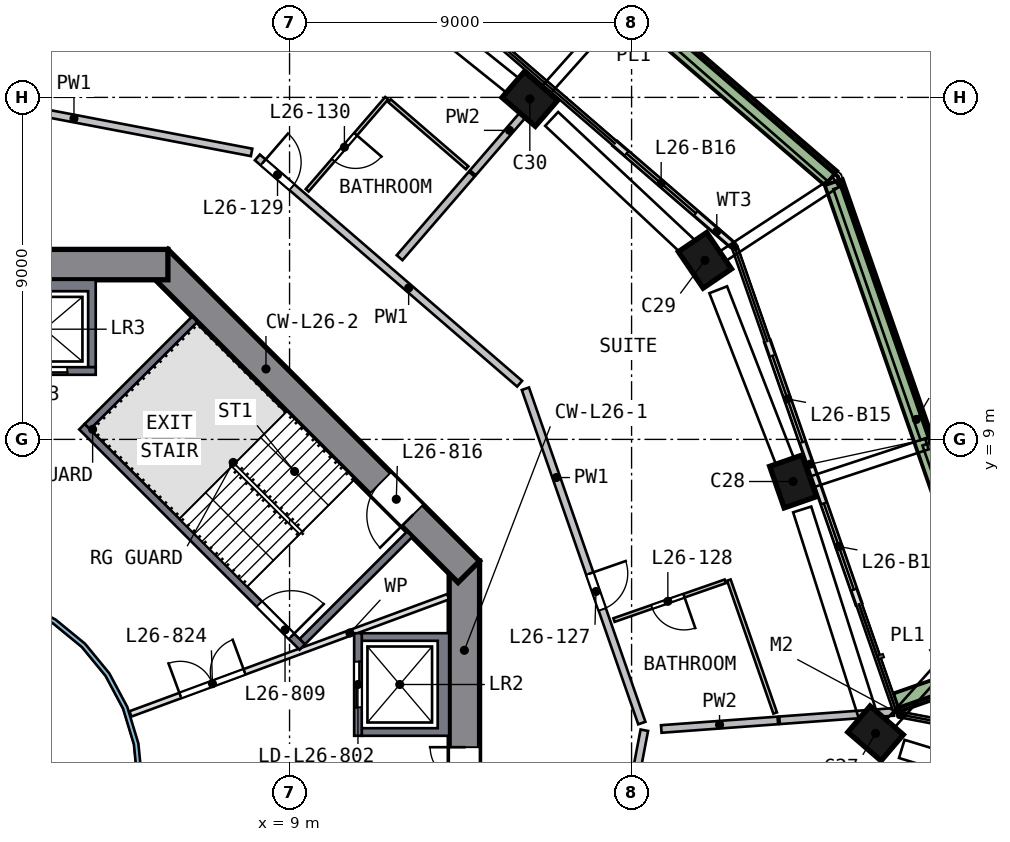
"""IFC4 building model, lengths in metres.
Left out: names, types, materials, properties, quantities, classifications, styles, units other than length and angle.
Written with IfcOpenShell. Run it as: python <this file> out.ifc"""

import sys

from ifc_helpers import new_model, si_unit, direction, frame, frame_2d, origin, origin_2d, place, context, subcontext, project, spatial, polyline, rectangle, outline, extrude, element, fill, save


model = new_model("IFC4")
c1 = context("Model", 3, precision=1e-05, world=origin(), true_north=direction((0.0, 1.0)))
c2 = subcontext(c1, "Body", "Model", "MODEL_VIEW")
j1 = project(units=[si_unit("LENGTHUNIT", "METRE"), si_unit("PLANEANGLEUNIT", "RADIAN")], contexts=[c1])
p1 = place(None, origin())
s1 = spatial("IfcSite", under=j1, at=p1, CompositionType="ELEMENT")
p2 = place(p1, origin())
s2 = spatial("IfcBuilding", under=s1, at=p2, CompositionType="ELEMENT")
p3 = place(p2, frame((0.0, 0.0, 111.5)))
s3 = spatial("IfcBuildingStorey", under=s2, at=p3, CompositionType="ELEMENT", Elevation=111.5)
p4 = place(p3, frame((24.428, 1.123, 0.0), z_axis=(-0.006309298, 0.116075877, 0.99322031), x_axis=(0.758959618, -0.646162715, 0.080337067)))
e1 = element("IfcColumn", 1, at=p4, inside=s3, PredefinedType="COLUMN", context=c2, shape_type="SweptSolid", body=[
    extrude(rectangle(XDim=1.15, YDim=0.9, at=origin_2d()), origin(), (0.0, 0.0, 1.0), 3.212),
])
p5 = place(p3, frame((22.295, 7.764, 0.0), z_axis=(-0.037872832, 0.105785359, 0.993667503), x_axis=(-0.326980648, 0.938328119, -0.112356557)))
e2 = element("IfcColumn", 2, at=p5, inside=s3, PredefinedType="COLUMN", context=c2, shape_type="SweptSolid", body=[
    extrude(rectangle(XDim=1.15, YDim=0.9, at=origin_2d()), origin(), (0.0, 0.0, 1.0), 3.21),
])
p6 = place(p3, frame((20.009, 13.598, 0.0), z_axis=(-0.065458875, 0.09457705, 0.993363135), x_axis=(0.558375251, -0.821576739, 0.115016268)))
e3 = element("IfcColumn", 3, at=p6, inside=s3, PredefinedType="COLUMN", context=c2, shape_type="SweptSolid", body=[
    extrude(rectangle(XDim=1.15, YDim=0.9, at=origin_2d()), origin(), (0.0, 0.0, 1.0), 3.211),
])
p7 = place(p3, frame((15.426, 17.871, 0.0), z_axis=(-0.085632411, 0.072703894, 0.993670586), x_axis=(-0.751997746, 0.649524072, -0.112329288)))
e4 = element("IfcColumn", 4, at=p7, inside=s3, PredefinedType="COLUMN", context=c2, shape_type="SweptSolid", body=[
    extrude(rectangle(XDim=1.15, YDim=0.9, at=origin_2d()), origin(), (0.0, 0.0, 1.0), 3.21),
])
p8 = place(p3, frame((13.6, -5.799, 0.0), z_axis=(0.0, 0.0, 1.0), x_axis=(0.0, 1.0, 0.0)))
e5 = element("IfcWall", 5, at=p8, inside=s3, PredefinedType="SHEAR", context=c2, shape_type="SweptSolid", body=[
    extrude(rectangle(XDim=11.598, YDim=0.8, at=frame_2d((5.799, 0.0))), origin(), (0.0, 0.0, 1.0), 3.5),
])
p9 = place(p8, frame((4.899, 0.0, 0.0)))
e6 = element("IfcOpeningElement", 6, at=p9, cuts=e5, PredefinedType="OPENING", context=c2, shape_type="SweptSolid", body=[
    extrude(rectangle(XDim=1.8, YDim=2.1, at=frame_2d((0.9, 1.05))), frame((0.0, 0.41, 0.0), z_axis=(0.0, -1.0, 0.0), x_axis=(1.0, 0.0, 0.0)), (0.0, 0.0, 1.0), 0.82),
])
p10 = place(p3, frame((13.717, 5.516, 0.0), z_axis=(0.0, 0.0, 1.0), x_axis=(-0.707106781, 0.707106781, 0.0)))
e7 = element("IfcWall", 7, at=p10, inside=s3, PredefinedType="SHEAR", context=c2, shape_type="SweptSolid", body=[
    extrude(rectangle(XDim=11.598, YDim=0.8, at=frame_2d((5.799, 0.0))), origin(), (0.0, 0.0, 1.0), 3.5),
])
p11 = place(p10, frame((2.099, 0.0, 0.0)))
e8 = element("IfcOpeningElement", 8, at=p11, cuts=e7, PredefinedType="OPENING", context=c2, shape_type="SweptSolid", body=[
    extrude(rectangle(XDim=1.2, YDim=2.1, at=frame_2d((0.6, 1.05))), frame((0.0, 0.41, 0.0), z_axis=(0.0, -1.0, 0.0), x_axis=(1.0, 0.0, 0.0)), (0.0, 0.0, 1.0), 0.82),
])
p12 = place(p3, frame((5.799, 13.6, 0.0), z_axis=(0.0, 0.0, 1.0), x_axis=(-1.0, 0.0, 0.0)))
e9 = element("IfcWall", 9, at=p12, inside=s3, PredefinedType="SHEAR", context=c2, shape_type="SweptSolid", body=[
    extrude(rectangle(XDim=11.598, YDim=0.8, at=frame_2d((5.799, 0.0))), origin(), (0.0, 0.0, 1.0), 3.5),
])
p13 = place(p12, frame((4.899, 0.0, 0.0)))
e10 = element("IfcOpeningElement", 10, at=p13, cuts=e9, PredefinedType="OPENING", context=c2, shape_type="SweptSolid", body=[
    extrude(rectangle(XDim=1.8, YDim=2.1, at=frame_2d((0.9, 1.05))), frame((0.0, 0.41, 0.0), z_axis=(0.0, -1.0, 0.0), x_axis=(1.0, 0.0, 0.0)), (0.0, 0.0, 1.0), 0.82),
])
p14 = place(p3, frame((23.981, 4.671, 0.0), z_axis=(0.0, 0.0, 1.0), x_axis=(-0.328866668, 0.944376363, 0.0)))
e11 = element("IfcWall", 11, at=p14, inside=s3, PredefinedType="SOLIDWALL", context=c2, shape_type="SweptSolid", body=[
    extrude(rectangle(XDim=3.475, YDim=0.15, at=frame_2d((1.738, 0.0))), origin(), (0.0, 0.0, 1.0), 2.425),
])
p15 = place(p14, frame((0.4, 0.0, 0.0)))
e12 = element("IfcOpeningElement", 12, at=p15, cuts=e11, PredefinedType="OPENING", context=c2, shape_type="SweptSolid", body=[
    extrude(rectangle(XDim=2.4, YDim=2.4, at=frame_2d((1.2, 1.2))), frame((0.0, 0.085, 0.0), z_axis=(0.0, -1.0, 0.0), x_axis=(1.0, 0.0, 0.0)), (0.0, 0.0, 1.0), 0.17),
])
p16 = place(p3, frame((22.838, 7.953, 0.0), z_axis=(0.0, 0.0, 1.0), x_axis=(-0.328841564, 0.944385104, 0.0)))
e13 = element("IfcWall", 13, at=p16, inside=s3, PredefinedType="SOLIDWALL", context=c2, shape_type="SweptSolid", body=[
    extrude(rectangle(XDim=3.835, YDim=0.15, at=frame_2d((1.918, 0.0))), origin(), (0.0, 0.0, 1.0), 2.425),
])
p17 = place(p16, frame((1.035, 0.0, 0.0)))
e14 = element("IfcOpeningElement", 14, at=p17, cuts=e13, PredefinedType="OPENING", context=c2, shape_type="SweptSolid", body=[
    extrude(rectangle(XDim=2.4, YDim=2.4, at=frame_2d((1.2, 1.2))), frame((0.0, 0.085, 0.0), z_axis=(0.0, -1.0, 0.0), x_axis=(1.0, 0.0, 0.0)), (0.0, 0.0, 1.0), 0.17),
])
p18 = place(p3, frame((20.646, 14.125, 0.0), z_axis=(0.0, 0.0, 1.0), x_axis=(-0.757002464, 0.653412021, 0.0)))
e15 = element("IfcWall", 15, at=p18, inside=s3, PredefinedType="SOLIDWALL", context=c2, shape_type="SweptSolid", body=[
    extrude(rectangle(XDim=4.068, YDim=0.15, at=frame_2d((2.034, 0.0))), origin(), (0.0, 0.0, 1.0), 2.425),
])
p19 = place(p18, frame((1.268, 0.0, 0.0)))
e16 = element("IfcOpeningElement", 16, at=p19, cuts=e15, PredefinedType="OPENING", context=c2, shape_type="SweptSolid", body=[
    extrude(rectangle(XDim=2.4, YDim=2.4, at=frame_2d((1.2, 1.2))), frame((0.0, 0.085, 0.0), z_axis=(0.0, -1.0, 0.0), x_axis=(1.0, 0.0, 0.0)), (0.0, 0.0, 1.0), 0.17),
])
p20 = place(p3, frame((24.965, 2.076, 0.0), z_axis=(0.0, 0.0, 1.0), x_axis=(0.944378331, 0.328861017, 0.0)))
e17 = element("IfcWall", 17, at=p20, inside=s3, PredefinedType="SOLIDWALL", context=c2, shape_type="SweptSolid", body=[
    extrude(rectangle(XDim=3.199, YDim=0.5, at=frame_2d((1.6, 0.0))), origin(), (0.0, 0.0, 1.0), 0.7),
])
p21 = place(p3, frame((27.668, 3.282, 0.0), z_axis=(0.0, 0.0, 1.0), x_axis=(-0.328877933, 0.94437244, 0.0)))
e18 = element("IfcWall", 18, at=p21, inside=s3, PredefinedType="SOLIDWALL", context=c2, shape_type="SweptSolid", body=[
    extrude(rectangle(XDim=13.223, YDim=0.5, at=frame_2d((6.612, 0.0))), origin(), (0.0, 0.0, 1.0), 0.7),
])
p22 = place(p3, frame((23.247, 15.877, 0.0), z_axis=(0.0, 0.0, 1.0), x_axis=(-0.757002985, 0.653411418, 0.0)))
e19 = element("IfcWall", 19, at=p22, inside=s3, PredefinedType="SOLIDWALL", context=c2, shape_type="SweptSolid", body=[
    extrude(rectangle(XDim=13.723, YDim=0.5, at=frame_2d((6.862, 0.0))), origin(), (0.0, 0.0, 1.0), 0.7),
])
p23 = place(p3, origin())
e20 = element("IfcWall", 20, at=p23, inside=s3, PredefinedType="SOLIDWALL", context=c2, shape_type="SweptSolid", body=[
    extrude(outline(polyline([(13.2, 3.9), (13.2, 1.2), (10.9, 1.2), (10.9, 1.4), (12.9, 1.4), (12.9, 3.7), (10.9, 3.7), (10.9, 3.9), (13.2, 3.9)])), origin(), (0.0, 0.0, 1.0), 3.19),
])
p24 = place(p3, frame((10.8, 1.2, 0.0), z_axis=(0.0, 0.0, 1.0), x_axis=(0.0, 1.0, 0.0)))
e21 = element("IfcWall", 21, at=p24, inside=s3, PredefinedType="SOLIDWALL", context=c2, shape_type="SweptSolid", body=[
    extrude(rectangle(XDim=2.7, YDim=0.2, at=frame_2d((1.35, 0.0))), origin(), (0.0, 0.0, 1.0), 3.19),
])
p25 = place(p24, frame((0.75, 0.0, 0.0)))
e22 = element("IfcOpeningElement", 22, at=p25, cuts=e21, PredefinedType="OPENING", context=c2, shape_type="SweptSolid", body=[
    extrude(rectangle(XDim=1.2, YDim=2.1, at=frame_2d((0.6, 1.05))), frame((0.0, 0.11, 0.0), z_axis=(0.0, -1.0, 0.0), x_axis=(1.0, 0.0, 0.0)), (0.0, 0.0, 1.0), 0.22),
])
p26 = place(p3, origin())
e23 = element("IfcWall", 23, at=p26, inside=s3, PredefinedType="SOLIDWALL", context=c2, shape_type="SweptSolid", body=[
    extrude(outline(polyline([(3.9, 13.2), (3.9, 10.9), (3.7, 10.9), (3.7, 12.9), (1.4, 12.9), (1.4, 10.9), (1.2, 10.9), (1.2, 13.2), (3.9, 13.2)])), origin(), (0.0, 0.0, 1.0), 3.19),
])
p27 = place(p3, frame((1.2, 10.8, 0.0), z_axis=(0.0, 0.0, 1.0), x_axis=(1.0, 0.0, 0.0)))
e24 = element("IfcWall", 24, at=p27, inside=s3, PredefinedType="SOLIDWALL", context=c2, shape_type="SweptSolid", body=[
    extrude(rectangle(XDim=2.7, YDim=0.2, at=frame_2d((1.35, 0.0))), origin(), (0.0, 0.0, 1.0), 3.19),
])
p28 = place(p27, frame((0.75, 0.0, 0.0)))
e25 = element("IfcOpeningElement", 25, at=p28, cuts=e24, PredefinedType="OPENING", context=c2, shape_type="SweptSolid", body=[
    extrude(rectangle(XDim=1.2, YDim=2.1, at=frame_2d((0.6, 1.05))), frame((0.0, 0.11, 0.0), z_axis=(0.0, -1.0, 0.0), x_axis=(1.0, 0.0, 0.0)), (0.0, 0.0, 1.0), 0.22),
])
p29 = place(p3, frame((3.535, 9.334, 0.0), z_axis=(0.0, 0.0, 1.0), x_axis=(0.707106781, -0.707106781, 0.0)))
e26 = element("IfcWall", 26, at=p29, inside=s3, PredefinedType="SOLIDWALL", context=c2, shape_type="SweptSolid", body=[
    extrude(rectangle(XDim=8.2, YDim=0.2, at=frame_2d((4.1, 0.0))), origin(), (0.0, 0.0, 1.0), 3.19),
])
p30 = place(p29, frame((6.6, 0.0, 0.0)))
e27 = element("IfcOpeningElement", 27, at=p30, cuts=e26, PredefinedType="OPENING", context=c2, shape_type="SweptSolid", body=[
    extrude(rectangle(XDim=1.2, YDim=2.1, at=frame_2d((0.6, 1.05))), frame((0.0, 0.11, 0.0), z_axis=(0.0, -1.0, 0.0), x_axis=(1.0, 0.0, 0.0)), (0.0, 0.0, 1.0), 0.22),
])
for number, where, z_axis, x_axis in (
    (28, (9.334, 3.677, 0.0), (0.0, 0.0, 1.0), (0.707, 0.707, 0.0)),
    (29, (3.677, 9.334, 0.0), (0.0, 0.0, 1.0), (0.707, 0.707, 0.0)),
):
    element("IfcWall", number, at=place(p3, frame(where, z_axis=z_axis, x_axis=x_axis)), inside=s3, PredefinedType="SOLIDWALL", context=c2, shape_type="SweptSolid", body=[
        extrude(rectangle(XDim=4.0, YDim=0.2, at=frame_2d((2.0, 0.0))), origin(), (0.0, 0.0, 1.0), 3.19),
    ])
p31 = place(p3, frame((4.813, 1.776, 0.0), z_axis=(0.0, 0.0, 1.0), x_axis=(0.938191915, 0.346115488, 0.0)))
e30 = element("IfcWall", 30, at=p31, inside=s3, PredefinedType="PARTITIONING", context=c2, shape_type="SweptSolid", body=[
    extrude(rectangle(XDim=8.91, YDim=0.15, at=frame_2d((4.455, 0.0))), origin(), (0.0, 0.0, 1.0), 3.19),
])
p32 = place(p31, frame((1.4, 0.0, 0.0)))
e31 = element("IfcOpeningElement", 31, at=p32, cuts=e30, PredefinedType="OPENING", context=c2, shape_type="SweptSolid", body=[
    extrude(rectangle(XDim=1.8, YDim=2.1, at=frame_2d((0.9, 1.05))), frame((0.0, 0.085, 0.0), z_axis=(0.0, -1.0, 0.0), x_axis=(1.0, 0.0, 0.0)), (0.0, 0.0, 1.0), 0.17),
])
p33 = place(p3, origin())
e32 = element("IfcWall", 32, at=p33, inside=s3, PredefinedType="SOLIDWALL", context=c2, shape_type="SweptSolid", body=[
    extrude(outline(polyline([(5.021, -0.999), (4.73, -1.959), (4.257, -2.844), (3.62, -3.62), (2.844, -4.257), (1.959, -4.73), (0.999, -5.021), (0.0, -5.12), (-0.999, -5.021), (-1.959, -4.73), (-2.844, -4.257), (-3.62, -3.62), (-4.257, -2.844), (-4.73, -1.959), (-5.021, -0.999), (-5.12, 0.0), (-5.021, 0.999), (-4.73, 1.959), (-4.257, 2.844), (-3.62, 3.62), (-2.844, 4.257), (-1.959, 4.73), (-0.999, 5.021), (0.0, 5.12), (0.999, 5.021), (1.959, 4.73), (2.844, 4.257), (3.62, 3.62), (4.257, 2.844), (4.73, 1.959), (5.021, 0.999), (5.12, 0.0), (5.021, -0.999)]), holes=[polyline([(4.904, 0.976), (4.619, 1.913), (4.157, 2.778), (3.535, 3.535), (2.778, 4.157), (1.913, 4.619), (0.976, 4.904), (0.0, 5.0), (-0.976, 4.904), (-1.913, 4.619), (-2.778, 4.157), (-3.535, 3.535), (-4.157, 2.778), (-4.619, 1.913), (-4.904, 0.976), (-5.0, 0.0), (-4.904, -0.976), (-4.619, -1.913), (-4.157, -2.778), (-3.535, -3.535), (-2.778, -4.157), (-1.913, -4.619), (-0.976, -4.904), (0.0, -5.0), (0.976, -4.904), (1.913, -4.619), (2.778, -4.157), (3.535, -3.535), (4.157, -2.778), (4.619, -1.913), (4.904, -0.976), (5.0, 0.0), (4.904, 0.976)])]), origin(), (0.0, 0.0, 1.0), 3.19),
])
p34 = place(p3, frame((8.001, 16.552, 0.0), z_axis=(0.0, 0.0, 1.0), x_axis=(-0.982286432, 0.187385606, 0.0)))
e33 = element("IfcWall", 33, at=p34, inside=s3, PredefinedType="SOLIDWALL", context=c2, shape_type="SweptSolid", body=[
    extrude(rectangle(XDim=9.516, YDim=0.2, at=frame_2d((4.758, 0.0))), origin(), (0.0, 0.0, 1.0), 3.19),
])
p35 = place(p3, frame((8.153, 16.421, 0.0), z_axis=(0.0, 0.0, 1.0), x_axis=(0.757004243, -0.65340996, 0.0)))
e34 = element("IfcWall", 34, at=p35, inside=s3, PredefinedType="SOLIDWALL", context=c2, shape_type="SweptSolid", body=[
    extrude(rectangle(XDim=9.116, YDim=0.2, at=frame_2d((4.558, 0.0))), origin(), (0.0, 0.0, 1.0), 3.19),
])
p36 = place(p35, frame((0.2, 0.0, 0.0)))
e35 = element("IfcOpeningElement", 35, at=p36, cuts=e34, PredefinedType="OPENING", context=c2, shape_type="SweptSolid", body=[
    extrude(rectangle(XDim=1.0, YDim=2.1, at=frame_2d((0.5, 1.05))), frame((0.0, 0.11, 0.0), z_axis=(0.0, -1.0, 0.0), x_axis=(1.0, 0.0, 0.0)), (0.0, 0.0, 1.0), 0.22),
])
p37 = place(p3, frame((15.206, 10.333, 0.0), z_axis=(0.0, 0.0, 1.0), x_axis=(0.328865176, -0.944376882, 0.0)))
e36 = element("IfcWall", 36, at=p37, inside=s3, PredefinedType="SOLIDWALL", context=c2, shape_type="SweptSolid", body=[
    extrude(rectangle(XDim=9.316, YDim=0.2, at=frame_2d((4.658, 0.0))), origin(), (0.0, 0.0, 1.0), 3.19),
])
p38 = place(p37, frame((5.15, 0.0, 0.0)))
e37 = element("IfcOpeningElement", 37, at=p38, cuts=e36, PredefinedType="OPENING", context=c2, shape_type="SweptSolid", body=[
    extrude(rectangle(XDim=1.0, YDim=2.1, at=frame_2d((0.5, 1.05))), frame((0.0, 0.11, 0.0), z_axis=(0.0, -1.0, 0.0), x_axis=(1.0, 0.0, 0.0)), (0.0, 0.0, 1.0), 0.22),
])
p39 = place(p3, frame((17.688, -2.051, 0.0), z_axis=(0.0, 0.0, 1.0), x_axis=(0.18736514, 0.982290336, 0.0)))
e38 = element("IfcWall", 38, at=p39, inside=s3, PredefinedType="SOLIDWALL", context=c2, shape_type="SweptSolid", body=[
    extrude(rectangle(XDim=3.458, YDim=0.2, at=frame_2d((1.729, 0.0))), origin(), (0.0, 0.0, 1.0), 3.19),
])
p40 = place(p3, frame((11.896, 13.781, 0.0), z_axis=(0.0, 0.0, 1.0), x_axis=(0.653390076, 0.757021406, 0.0)))
e39 = element("IfcWall", 39, at=p40, inside=s3, PredefinedType="SOLIDWALL", context=c2, shape_type="SweptSolid", body=[
    extrude(rectangle(XDim=2.905, YDim=0.2, at=frame_2d((1.452, 0.0))), origin(), (0.0, 0.0, 1.0), 3.19),
])
p41 = place(p3, frame((13.824, 16.015, 0.0), z_axis=(0.0, 0.0, 1.0), x_axis=(0.653389434, 0.75702196, 0.0)))
e40 = element("IfcWall", 40, at=p41, inside=s3, PredefinedType="SOLIDWALL", context=c2, shape_type="SweptSolid", body=[
    extrude(rectangle(XDim=2.952, YDim=0.2, at=frame_2d((1.476, 0.0))), origin(), (0.0, 0.0, 1.0), 3.19),
])
p42 = place(p3, frame((18.781, 1.379, 0.0), z_axis=(0.0, 0.0, 1.0), x_axis=(0.997310699, 0.073289632, 0.0)))
e41 = element("IfcWall", 41, at=p42, inside=s3, PredefinedType="SOLIDWALL", context=c2, shape_type="SweptSolid", body=[
    extrude(rectangle(XDim=3.075, YDim=0.2, at=frame_2d((1.537, 0.0))), origin(), (0.0, 0.0, 1.0), 3.19),
])
p43 = place(p3, frame((21.894, 1.608, 0.0), z_axis=(0.0, 0.0, 1.0), x_axis=(0.997316425, 0.073211668, 0.0)))
e42 = element("IfcWall", 42, at=p43, inside=s3, PredefinedType="SOLIDWALL", context=c2, shape_type="SweptSolid", body=[
    extrude(rectangle(XDim=3.011, YDim=0.2, at=frame_2d((1.506, 0.0))), origin(), (0.0, 0.0, 1.0), 3.19),
])
p44 = place(p3, frame((11.554, 17.977, 0.0), z_axis=(0.0, 0.0, 1.0), x_axis=(-0.653401338, -0.757011685, 0.0)))
e43 = element("IfcWall", 43, at=p44, inside=s3, PredefinedType="PARTITIONING", context=c2, shape_type="SweptSolid", body=[
    extrude(rectangle(XDim=3.2, YDim=0.1, at=frame_2d((1.6, 0.0))), origin(), (0.0, 0.0, 1.0), 3.19),
])
p45 = place(p44, frame((1.25, 0.0, 0.0)))
e44 = element("IfcOpeningElement", 44, at=p45, cuts=e43, PredefinedType="OPENING", context=c2, shape_type="SweptSolid", body=[
    extrude(rectangle(XDim=0.9, YDim=2.1, at=frame_2d((0.45, 1.05))), frame((0.0, 0.06, 0.0), z_axis=(0.0, -1.0, 0.0), x_axis=(1.0, 0.0, 0.0)), (0.0, 0.0, 1.0), 0.12),
])
p46 = place(p3, frame((11.63, 17.912, 0.0), z_axis=(0.0, 0.0, 1.0), x_axis=(0.757018158, -0.653393838, 0.0)))
e45 = element("IfcWall", 45, at=p46, inside=s3, PredefinedType="PARTITIONING", context=c2, shape_type="SweptSolid", body=[
    extrude(rectangle(XDim=2.7, YDim=0.1, at=frame_2d((1.35, 0.0))), origin(), (0.0, 0.0, 1.0), 3.19),
])
p47 = place(p3, frame((20.465, 5.265, 0.0), z_axis=(0.0, 0.0, 1.0), x_axis=(-0.944369228, -0.328887157, 0.0)))
e46 = element("IfcWall", 46, at=p47, inside=s3, PredefinedType="PARTITIONING", context=c2, shape_type="SweptSolid", body=[
    extrude(rectangle(XDim=3.1, YDim=0.1, at=frame_2d((1.55, 0.0))), origin(), (0.0, 0.0, 1.0), 3.19),
])
p48 = place(p47, frame((1.15, 0.0, 0.0)))
e47 = element("IfcOpeningElement", 47, at=p48, cuts=e46, PredefinedType="OPENING", context=c2, shape_type="SweptSolid", body=[
    extrude(rectangle(XDim=0.9, YDim=2.1, at=frame_2d((0.45, 1.05))), frame((0.0, 0.06, 0.0), z_axis=(0.0, -1.0, 0.0), x_axis=(1.0, 0.0, 0.0)), (0.0, 0.0, 1.0), 0.12),
])
p49 = place(p3, frame((20.56, 5.298, 0.0), z_axis=(0.0, 0.0, 1.0), x_axis=(0.32885552, -0.944380245, 0.0)))
e48 = element("IfcWall", 48, at=p49, inside=s3, PredefinedType="PARTITIONING", context=c2, shape_type="SweptSolid", body=[
    extrude(rectangle(XDim=3.704, YDim=0.1, at=frame_2d((1.852, 0.0))), origin(), (0.0, 0.0, 1.0), 3.19),
])
p50 = place(p15, origin())
e49 = element("IfcDoor", 49, at=p50, inside=s3, OperationType="SLIDING_TO_RIGHT", PredefinedType="DOOR", context=c2, shape_type="SweptSolid", body=[
    extrude(rectangle(XDim=2.4, YDim=2.4, at=frame_2d((1.2, 1.2))), frame((0.0, 0.025, 0.0), z_axis=(0.0, -1.0, 0.0), x_axis=(1.0, 0.0, 0.0)), (0.0, 0.0, 1.0), 0.05),
])
fill(e12, e49)
p51 = place(p17, origin())
e50 = element("IfcDoor", 50, at=p51, inside=s3, OperationType="SLIDING_TO_LEFT", PredefinedType="DOOR", context=c2, shape_type="SweptSolid", body=[
    extrude(rectangle(XDim=2.4, YDim=2.4, at=frame_2d((1.2, 1.2))), frame((0.0, 0.025, 0.0), z_axis=(0.0, -1.0, 0.0), x_axis=(1.0, 0.0, 0.0)), (0.0, 0.0, 1.0), 0.05),
])
fill(e14, e50)
p52 = place(p19, origin())
e51 = element("IfcDoor", 51, at=p52, inside=s3, OperationType="SLIDING_TO_LEFT", PredefinedType="DOOR", context=c2, shape_type="SweptSolid", body=[
    extrude(rectangle(XDim=2.4, YDim=2.4, at=frame_2d((1.2, 1.2))), frame((0.0, 0.025, 0.0), z_axis=(0.0, -1.0, 0.0), x_axis=(1.0, 0.0, 0.0)), (0.0, 0.0, 1.0), 0.05),
])
fill(e16, e51)
p53 = place(p25, origin())
e52 = element("IfcDoor", 52, at=p53, inside=s3, OperationType="DOUBLE_DOOR_SLIDING", PredefinedType="DOOR", context=c2, shape_type="SweptSolid", body=[
    extrude(rectangle(XDim=1.2, YDim=2.1, at=frame_2d((0.6, 1.05))), frame((0.0, 0.025, 0.0), z_axis=(0.0, -1.0, 0.0), x_axis=(1.0, 0.0, 0.0)), (0.0, 0.0, 1.0), 0.05),
])
fill(e22, e52)
p54 = place(p28, origin())
e53 = element("IfcDoor", 53, at=p54, inside=s3, OperationType="DOUBLE_DOOR_SLIDING", PredefinedType="DOOR", context=c2, shape_type="SweptSolid", body=[
    extrude(rectangle(XDim=1.2, YDim=2.1, at=frame_2d((0.6, 1.05))), frame((0.0, 0.025, 0.0), z_axis=(0.0, -1.0, 0.0), x_axis=(1.0, 0.0, 0.0)), (0.0, 0.0, 1.0), 0.05),
])
fill(e25, e53)
p55 = place(p30, origin())
e54 = element("IfcDoor", 54, at=p55, inside=s3, OperationType="SINGLE_SWING_RIGHT", PredefinedType="DOOR", context=c2, shape_type="SweptSolid", body=[
    extrude(rectangle(XDim=1.2, YDim=2.1, at=frame_2d((0.6, 1.05))), frame((0.0, 0.025, 0.0), z_axis=(0.0, -1.0, 0.0), x_axis=(1.0, 0.0, 0.0)), (0.0, 0.0, 1.0), 0.05),
])
fill(e27, e54)
p56 = place(p9, origin())
e55 = element("IfcDoor", 55, at=p56, inside=s3, OperationType="DOUBLE_DOOR_SINGLE_SWING", PredefinedType="DOOR", context=c2, shape_type="SweptSolid", body=[
    extrude(rectangle(XDim=1.8, YDim=2.1, at=frame_2d((0.9, 1.05))), frame((0.0, 0.025, 0.0), z_axis=(0.0, -1.0, 0.0), x_axis=(1.0, 0.0, 0.0)), (0.0, 0.0, 1.0), 0.05),
])
fill(e6, e55)
p57 = place(p11, origin())
e56 = element("IfcDoor", 56, at=p57, inside=s3, OperationType="SINGLE_SWING_LEFT", PredefinedType="DOOR", context=c2, shape_type="SweptSolid", body=[
    extrude(rectangle(XDim=1.2, YDim=2.1, at=frame_2d((0.6, 1.05))), frame((0.0, 0.025, 0.0), z_axis=(0.0, -1.0, 0.0), x_axis=(1.0, 0.0, 0.0)), (0.0, 0.0, 1.0), 0.05),
])
fill(e8, e56)
p58 = place(p32, origin())
e57 = element("IfcDoor", 57, at=p58, inside=s3, OperationType="DOUBLE_DOOR_SINGLE_SWING", PredefinedType="DOOR", context=c2, shape_type="SweptSolid", body=[
    extrude(rectangle(XDim=1.8, YDim=2.1, at=frame_2d((0.9, 1.05))), frame((0.0, 0.025, 0.0), z_axis=(0.0, -1.0, 0.0), x_axis=(1.0, 0.0, 0.0)), (0.0, 0.0, 1.0), 0.05),
])
fill(e31, e57)
p59 = place(p38, origin())
e58 = element("IfcDoor", 58, at=p59, inside=s3, OperationType="SINGLE_SWING_LEFT", PredefinedType="DOOR", context=c2, shape_type="SweptSolid", body=[
    extrude(rectangle(XDim=1.0, YDim=2.1, at=frame_2d((0.5, 1.05))), frame((0.0, 0.025, 0.0), z_axis=(0.0, -1.0, 0.0), x_axis=(1.0, 0.0, 0.0)), (0.0, 0.0, 1.0), 0.05),
])
fill(e37, e58)
p60 = place(p48, origin())
e59 = element("IfcDoor", 59, at=p60, inside=s3, OperationType="SINGLE_SWING_LEFT", PredefinedType="DOOR", context=c2, shape_type="SweptSolid", body=[
    extrude(rectangle(XDim=0.9, YDim=2.1, at=frame_2d((0.45, 1.05))), frame((0.0, 0.025, 0.0), z_axis=(0.0, -1.0, 0.0), x_axis=(1.0, 0.0, 0.0)), (0.0, 0.0, 1.0), 0.05),
])
fill(e47, e59)
p61 = place(p36, origin())
e60 = element("IfcDoor", 60, at=p61, inside=s3, OperationType="SINGLE_SWING_LEFT", PredefinedType="DOOR", context=c2, shape_type="SweptSolid", body=[
    extrude(rectangle(XDim=1.0, YDim=2.1, at=frame_2d((0.5, 1.05))), frame((0.0, 0.025, 0.0), z_axis=(0.0, -1.0, 0.0), x_axis=(1.0, 0.0, 0.0)), (0.0, 0.0, 1.0), 0.05),
])
fill(e35, e60)
p62 = place(p45, origin())
e61 = element("IfcDoor", 61, at=p62, inside=s3, OperationType="SINGLE_SWING_LEFT", PredefinedType="DOOR", context=c2, shape_type="SweptSolid", body=[
    extrude(rectangle(XDim=0.9, YDim=2.1, at=frame_2d((0.45, 1.05))), frame((0.0, 0.025, 0.0), z_axis=(0.0, -1.0, 0.0), x_axis=(1.0, 0.0, 0.0)), (0.0, 0.0, 1.0), 0.05),
])
fill(e44, e61)
save(model, sys.argv[1])
